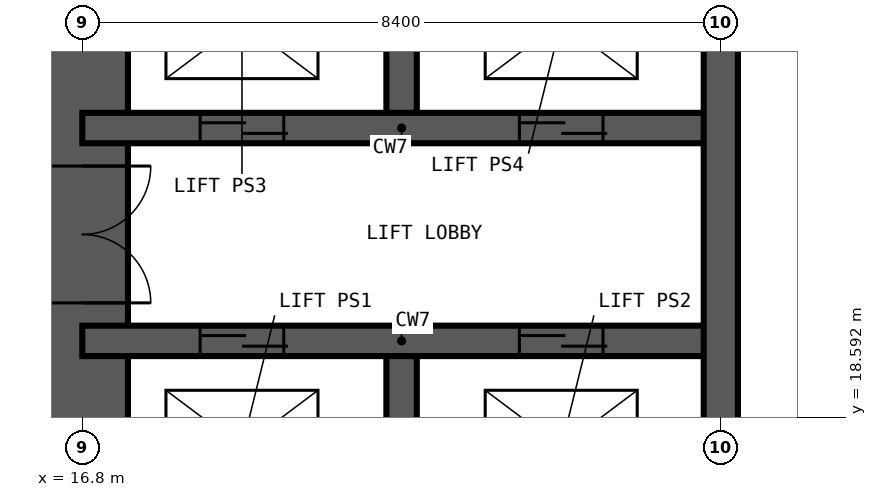
"""IFC4 building model, lengths in metres.
Left out: names, types, materials, properties, quantities, classifications, styles, units other than length and angle.
Written with IfcOpenShell. Run it as: python <this file> out.ifc"""

import sys

from ifc_helpers import new_model, si_unit, direction, frame, frame_2d, origin, place, context, subcontext, project, spatial, rectangle, extrude, element, fill, save


model = new_model("IFC4")
c1 = context("Model", 3, precision=1e-05, world=origin(), true_north=direction((0.0, 1.0)))
c2 = subcontext(c1, "Body", "Model", "MODEL_VIEW")
j1 = project(units=[si_unit("LENGTHUNIT", "METRE"), si_unit("PLANEANGLEUNIT", "RADIAN")], contexts=[c1])
p1 = place(None, origin())
s1 = spatial("IfcSite", under=j1, at=p1, CompositionType="ELEMENT")
p2 = place(p1, origin())
s2 = spatial("IfcBuilding", under=s1, at=p2, CompositionType="ELEMENT")
p3 = place(p2, frame((0.0, 0.0, 147.6)))
s3 = spatial("IfcBuildingStorey", under=s2, at=p3, CompositionType="ELEMENT", Elevation=147.6)
p4 = place(p3, frame((16.8, 41.4, -0.35), z_axis=(0.0, 0.0, 1.0), x_axis=(0.0, -1.0, 0.0)))
e1 = element("IfcWall", 1, at=p4, inside=s3, PredefinedType="SHEAR", context=c2, shape_type="SweptSolid", body=[
    extrude(rectangle(XDim=24.0, YDim=1.2, at=frame_2d((12.0, 0.0))), origin(), (0.0, 0.0, 1.0), 5.95),
])
p5 = place(p4, frame((11.1, 0.0, 0.35)))
e2 = element("IfcOpeningElement", 2, at=p5, cuts=e1, PredefinedType="OPENING", context=c2, shape_type="SweptSolid", body=[
    extrude(rectangle(XDim=1.8, YDim=2.2, at=frame_2d((0.9, 1.1))), frame((0.0, 0.61, 0.0), z_axis=(0.0, -1.0, 0.0), x_axis=(1.0, 0.0, 0.0)), (0.0, 0.0, 1.0), 1.22),
])
p6 = place(p4, frame((19.5, 0.0, 0.35)))
e3 = element("IfcOpeningElement", 3, at=p6, cuts=e1, PredefinedType="OPENING", context=c2, shape_type="SweptSolid", body=[
    extrude(rectangle(XDim=1.8, YDim=2.2, at=frame_2d((0.9, 1.1))), frame((0.0, 0.61, 0.0), z_axis=(0.0, -1.0, 0.0), x_axis=(1.0, 0.0, 0.0)), (0.0, 0.0, 1.0), 1.22),
])
p7 = place(p4, frame((5.2, 0.0, 0.35)))
e4 = element("IfcOpeningElement", 4, at=p7, cuts=e1, PredefinedType="OPENING", context=c2, shape_type="SweptSolid", body=[
    extrude(rectangle(XDim=1.0, YDim=2.1, at=frame_2d((0.5, 1.05))), frame((0.0, 0.61, 0.0), z_axis=(0.0, -1.0, 0.0), x_axis=(1.0, 0.0, 0.0)), (0.0, 0.0, 1.0), 1.22),
])
p8 = place(p3, frame((21.0, 16.8, -0.35), z_axis=(0.0, 0.0, 1.0), x_axis=(0.0, 1.0, 0.0)))
e5 = element("IfcWall", 5, at=p8, inside=s3, PredefinedType="SHEAR", context=c2, shape_type="SweptSolid", body=[
    extrude(rectangle(XDim=2.8, YDim=0.4, at=frame_2d((1.4, 0.0))), origin(), (0.0, 0.0, 1.0), 5.95),
])
p9 = place(p3, frame((21.0, 22.4, -0.35), z_axis=(0.0, 0.0, 1.0), x_axis=(0.0, 1.0, 0.0)))
e6 = element("IfcWall", 6, at=p9, inside=s3, PredefinedType="SHEAR", context=c2, shape_type="SweptSolid", body=[
    extrude(rectangle(XDim=5.6, YDim=0.4, at=frame_2d((2.8, 0.0))), origin(), (0.0, 0.0, 1.0), 5.95),
])
p10 = place(p3, frame((16.8, 19.6, -0.35), z_axis=(0.0, 0.0, 1.0), x_axis=(1.0, 0.0, 0.0)))
e7 = element("IfcWall", 7, at=p10, inside=s3, PredefinedType="SHEAR", context=c2, shape_type="SweptSolid", body=[
    extrude(rectangle(XDim=8.4, YDim=0.4, at=frame_2d((4.2, 0.0))), origin(), (0.0, 0.0, 1.0), 5.95),
])
p11 = place(p10, frame((1.55, 0.0, 0.35)))
e8 = element("IfcOpeningElement", 8, at=p11, cuts=e7, PredefinedType="OPENING", context=c2, shape_type="SweptSolid", body=[
    extrude(rectangle(XDim=1.1, YDim=2.2, at=frame_2d((0.55, 1.1))), frame((0.0, 0.21, 0.0), z_axis=(0.0, -1.0, 0.0), x_axis=(1.0, 0.0, 0.0)), (0.0, 0.0, 1.0), 0.42),
])
p12 = place(p10, frame((5.75, 0.0, 0.35)))
e9 = element("IfcOpeningElement", 9, at=p12, cuts=e7, PredefinedType="OPENING", context=c2, shape_type="SweptSolid", body=[
    extrude(rectangle(XDim=1.1, YDim=2.2, at=frame_2d((0.55, 1.1))), frame((0.0, 0.21, 0.0), z_axis=(0.0, -1.0, 0.0), x_axis=(1.0, 0.0, 0.0)), (0.0, 0.0, 1.0), 0.42),
])
p13 = place(p3, frame((16.8, 22.4, -0.35), z_axis=(0.0, 0.0, 1.0), x_axis=(1.0, 0.0, 0.0)))
e10 = element("IfcWall", 10, at=p13, inside=s3, PredefinedType="SHEAR", context=c2, shape_type="SweptSolid", body=[
    extrude(rectangle(XDim=8.4, YDim=0.4, at=frame_2d((4.2, 0.0))), origin(), (0.0, 0.0, 1.0), 5.95),
])
p14 = place(p13, frame((1.55, 0.0, 0.35)))
e11 = element("IfcOpeningElement", 11, at=p14, cuts=e10, PredefinedType="OPENING", context=c2, shape_type="SweptSolid", body=[
    extrude(rectangle(XDim=1.1, YDim=2.2, at=frame_2d((0.55, 1.1))), frame((0.0, 0.21, 0.0), z_axis=(0.0, -1.0, 0.0), x_axis=(1.0, 0.0, 0.0)), (0.0, 0.0, 1.0), 0.42),
])
p15 = place(p13, frame((5.75, 0.0, 0.35)))
e12 = element("IfcOpeningElement", 12, at=p15, cuts=e10, PredefinedType="OPENING", context=c2, shape_type="SweptSolid", body=[
    extrude(rectangle(XDim=1.1, YDim=2.2, at=frame_2d((0.55, 1.1))), frame((0.0, 0.21, 0.0), z_axis=(0.0, -1.0, 0.0), x_axis=(1.0, 0.0, 0.0)), (0.0, 0.0, 1.0), 0.42),
])
p16 = place(p3, frame((25.2, 16.8, -0.35), z_axis=(0.0, 0.0, 1.0), x_axis=(0.0, 1.0, 0.0)))
e13 = element("IfcWall", 13, at=p16, inside=s3, PredefinedType="SHEAR", context=c2, shape_type="SweptSolid", body=[
    extrude(rectangle(XDim=25.2, YDim=0.45, at=frame_2d((12.6, 0.0))), origin(), (0.0, 0.0, 1.0), 5.95),
])
p17 = place(p11, origin())
e14 = element("IfcDoor", 14, at=p17, inside=s3, OperationType="DOUBLE_DOOR_SLIDING", PredefinedType="DOOR", context=c2, shape_type="SweptSolid", body=[
    extrude(rectangle(XDim=1.1, YDim=2.2, at=frame_2d((0.55, 1.1))), frame((0.0, 0.025, 0.0), z_axis=(0.0, -1.0, 0.0), x_axis=(1.0, 0.0, 0.0)), (0.0, 0.0, 1.0), 0.05),
])
fill(e8, e14)
p18 = place(p12, origin())
e15 = element("IfcDoor", 15, at=p18, inside=s3, OperationType="DOUBLE_DOOR_SLIDING", PredefinedType="DOOR", context=c2, shape_type="SweptSolid", body=[
    extrude(rectangle(XDim=1.1, YDim=2.2, at=frame_2d((0.55, 1.1))), frame((0.0, 0.025, 0.0), z_axis=(0.0, -1.0, 0.0), x_axis=(1.0, 0.0, 0.0)), (0.0, 0.0, 1.0), 0.05),
])
fill(e9, e15)
p19 = place(p14, origin())
e16 = element("IfcDoor", 16, at=p19, inside=s3, OperationType="DOUBLE_DOOR_SLIDING", PredefinedType="DOOR", context=c2, shape_type="SweptSolid", body=[
    extrude(rectangle(XDim=1.1, YDim=2.2, at=frame_2d((0.55, 1.1))), frame((0.0, 0.025, 0.0), z_axis=(0.0, -1.0, 0.0), x_axis=(1.0, 0.0, 0.0)), (0.0, 0.0, 1.0), 0.05),
])
fill(e11, e16)
p20 = place(p15, origin())
e17 = element("IfcDoor", 17, at=p20, inside=s3, OperationType="DOUBLE_DOOR_SLIDING", PredefinedType="DOOR", context=c2, shape_type="SweptSolid", body=[
    extrude(rectangle(XDim=1.1, YDim=2.2, at=frame_2d((0.55, 1.1))), frame((0.0, 0.025, 0.0), z_axis=(0.0, -1.0, 0.0), x_axis=(1.0, 0.0, 0.0)), (0.0, 0.0, 1.0), 0.05),
])
fill(e12, e17)
p21 = place(p6, origin())
e18 = element("IfcDoor", 18, at=p21, inside=s3, OperationType="DOUBLE_DOOR_DOUBLE_SWING", PredefinedType="DOOR", context=c2, shape_type="SweptSolid", body=[
    extrude(rectangle(XDim=1.8, YDim=2.2, at=frame_2d((0.9, 1.1))), frame((0.0, 0.025, 0.0), z_axis=(0.0, -1.0, 0.0), x_axis=(1.0, 0.0, 0.0)), (0.0, 0.0, 1.0), 0.05),
])
fill(e3, e18)
save(model, sys.argv[1])
